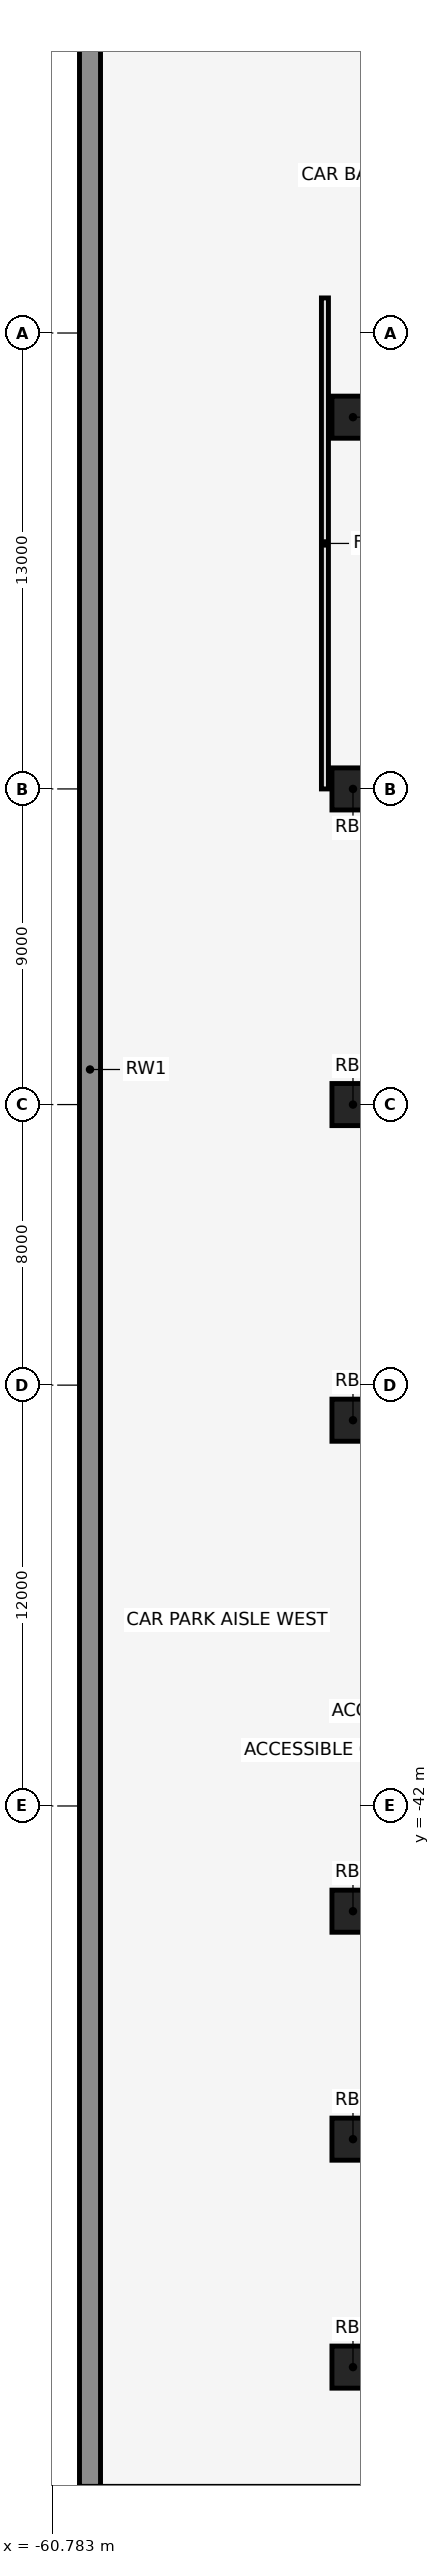
"""IFC4 building model, lengths in metres.
Left out: names, types, materials, properties, quantities, classifications, styles, units other than length and angle.
Written with IfcOpenShell. Run it as: python <this file> out.ifc"""

import sys

from ifc_helpers import new_model, si_unit, direction, frame, frame_2d, origin, origin_2d, place, context, subcontext, project, spatial, rectangle, extrude, element, save


model = new_model("IFC4")
c1 = context("Model", 3, precision=1e-05, world=origin(), true_north=direction((0.0, 1.0)))
c2 = subcontext(c1, "Body", "Model", "MODEL_VIEW")
j1 = project(units=[si_unit("LENGTHUNIT", "METRE"), si_unit("PLANEANGLEUNIT", "RADIAN")], contexts=[c1])
p1 = place(None, origin())
s1 = spatial("IfcSite", under=j1, at=p1, CompositionType="ELEMENT")
p2 = place(p1, origin())
s2 = spatial("IfcBuilding", under=s1, at=p2, CompositionType="ELEMENT")
p3 = place(p2, frame((0.0, 0.0, -10.0)))
s3 = spatial("IfcBuildingStorey", under=s2, at=p3, CompositionType="ELEMENT", Elevation=-10.0)
for number, where, z_axis, x_axis in (
    (1, (-52.2, -2.4, 0.0), (0.0, 0.0, 1.0), (1.0, 0.0, 0.0)),
    (2, (-52.2, -13.0, 0.0), (0.0, 0.0, 1.0), (1.0, 0.0, 0.0)),
    (3, (-52.2, -22.0, 0.0), (0.0, 0.0, 1.0), (1.0, 0.0, 0.0)),
    (4, (-52.2, -31.0, 0.0), (0.0, 0.0, 1.0), (1.0, 0.0, 0.0)),
    (5, (-52.2, -45.0, 0.0), (0.0, 0.0, 1.0), (1.0, 0.0, 0.0)),
    (6, (-52.2, -51.5, 0.0), (0.0, 0.0, 1.0), (1.0, 0.0, 0.0)),
    (7, (-52.2, -58.0, 0.0), (0.0, 0.0, 1.0), (1.0, 0.0, 0.0)),
):
    element("IfcColumn", number, at=place(p3, frame(where, z_axis=z_axis, x_axis=x_axis)), inside=s3, PredefinedType="COLUMN", context=c2, shape_type="SweptSolid", body=[
        extrude(rectangle(XDim=1.2, YDim=1.2, at=origin_2d()), origin(), (0.0, 0.0, 1.0), 5.0),
    ])
p4 = place(p3, frame((-59.7, -61.4, 0.0), z_axis=(0.0, 0.0, 1.0), x_axis=(0.0, 1.0, 0.0)))
e8 = element("IfcWall", 8, at=p4, inside=s3, PredefinedType="SOLIDWALL", context=c2, shape_type="SweptSolid", body=[
    extrude(rectangle(XDim=80.8, YDim=0.6, at=frame_2d((40.4, 0.0))), origin(), (0.0, 0.0, 1.0), 5.0),
])
p5 = place(p3, frame((-53.0, -13.0, 0.0), z_axis=(0.0, 0.0, 1.0), x_axis=(0.0, 1.0, 0.0)))
e9 = element("IfcWall", 9, at=p5, inside=s3, PredefinedType="PARTITIONING", context=c2, shape_type="SweptSolid", body=[
    extrude(rectangle(XDim=14.0, YDim=0.2, at=frame_2d((7.0, 0.0))), origin(), (0.0, 0.0, 1.0), 4.7),
])
save(model, sys.argv[1])
